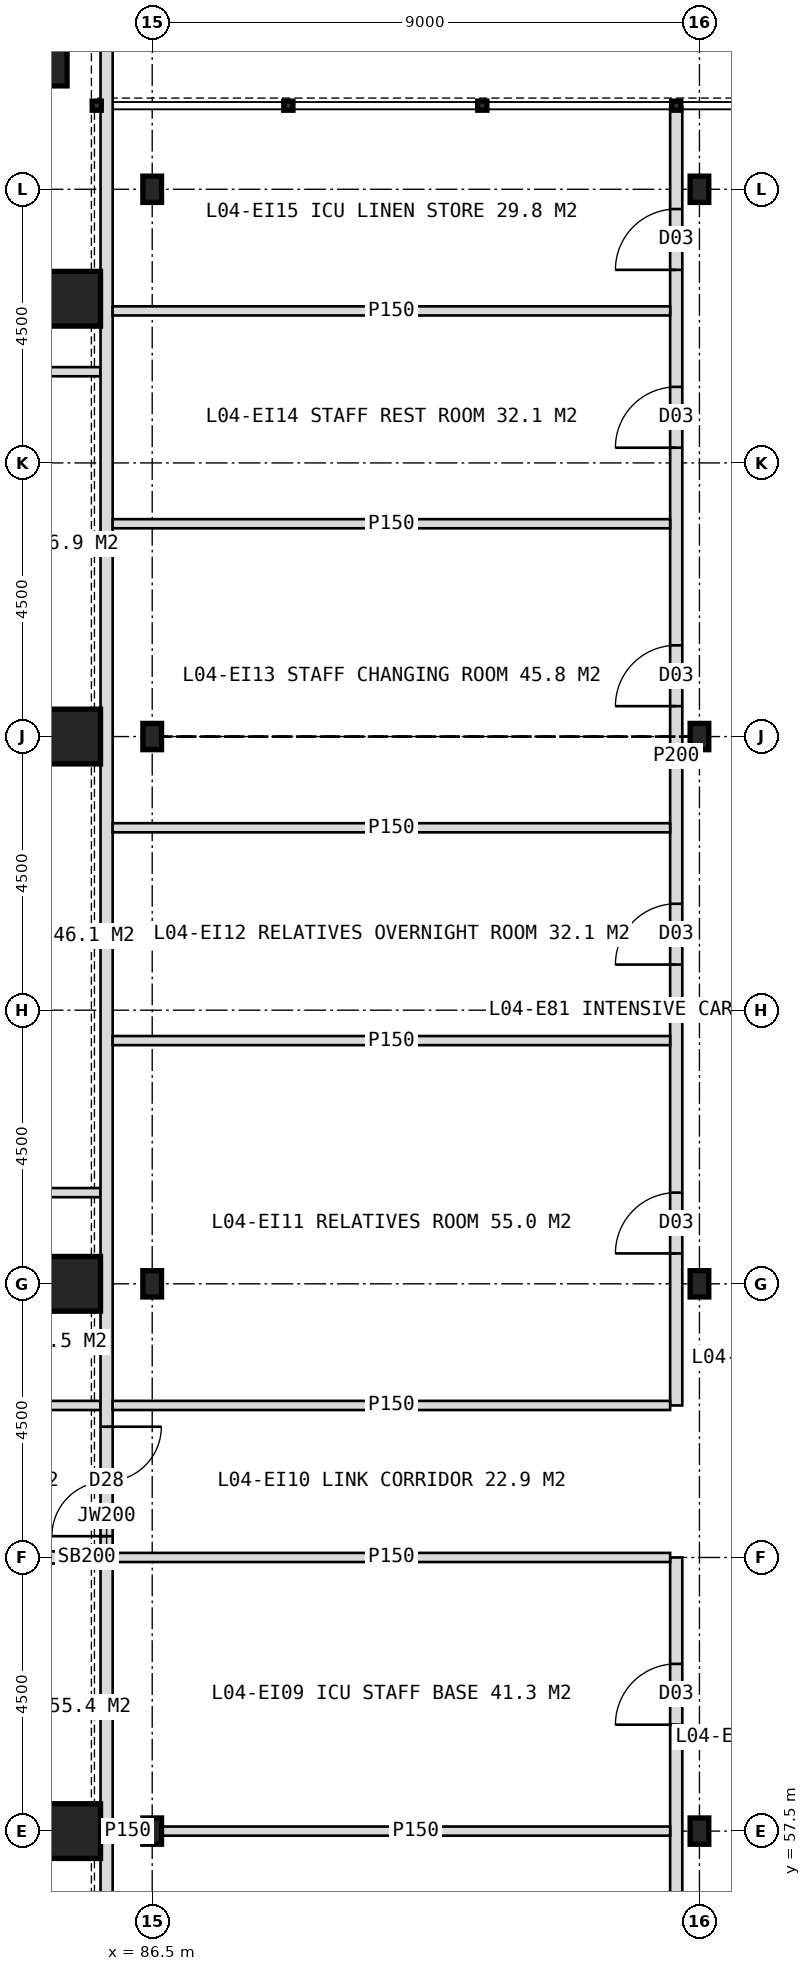
"""IFC4 building model, lengths in metres.
Left out: names, types, materials, properties, quantities, classifications, styles, units other than length and angle.
Written with IfcOpenShell. Run it as: python <this file> out.ifc"""

import sys

from ifc_helpers import new_model, si_unit, direction, frame, frame_2d, origin, origin_2d, place, context, subcontext, project, spatial, rectangle, hollow_rectangle, i_section, extrude, element, fill, save


model = new_model("IFC4")
c1 = context("Model", 3, precision=1e-05, world=origin(), true_north=direction((0.0, 1.0)))
c2 = subcontext(c1, "Body", "Model", "MODEL_VIEW")
j1 = project(units=[si_unit("LENGTHUNIT", "METRE"), si_unit("PLANEANGLEUNIT", "RADIAN")], contexts=[c1])
p1 = place(None, origin())
s1 = spatial("IfcSite", under=j1, at=p1, CompositionType="ELEMENT")
p2 = place(p1, origin())
s2 = spatial("IfcBuilding", under=s1, at=p2, CompositionType="ELEMENT")
p3 = place(p2, frame((0.0, 0.0, 21.0)))
s3 = spatial("IfcBuildingStorey", under=s2, at=p3, CompositionType="ELEMENT", Elevation=21.0)
for number, where, z_axis, x_axis in (
    (1, (85.2, 57.5, 0.0), (0.0, 0.0, 1.0), (1.0, 0.0, 0.0)),
    (2, (85.2, 66.5, 0.0), (0.0, 0.0, 1.0), (1.0, 0.0, 0.0)),
    (3, (85.2, 75.5, 0.0), (0.0, 0.0, 1.0), (1.0, 0.0, 0.0)),
    (4, (85.2, 82.7, 0.0), (0.0, 0.0, 1.0), (1.0, 0.0, 0.0)),
    (5, (84.65, 86.65, 0.0), (0.0, 0.0, 1.0), (1.0, 0.0, 0.0)),
):
    element("IfcColumn", number, at=place(p3, frame(where, z_axis=z_axis, x_axis=x_axis)), inside=s3, PredefinedType="COLUMN", context=c2, shape_type="SweptSolid", body=[
        extrude(hollow_rectangle(XDim=0.9, YDim=0.9, WallThickness=0.08, at=origin_2d()), origin(), (0.0, 0.0, 1.0), 5.0),
    ])
for number, where, z_axis, x_axis in (
    (6, (86.5, 57.5, 0.0), (0.0, 0.0, 1.0), (1.0, 0.0, 0.0)),
    (7, (86.5, 66.5, 0.0), (0.0, 0.0, 1.0), (1.0, 0.0, 0.0)),
    (8, (86.5, 75.5, 0.0), (0.0, 0.0, 1.0), (1.0, 0.0, 0.0)),
    (9, (86.5, 84.5, 0.0), (0.0, 0.0, 1.0), (1.0, 0.0, 0.0)),
    (10, (95.5, 57.5, 0.0), (0.0, 0.0, 1.0), (1.0, 0.0, 0.0)),
    (11, (95.5, 66.5, 0.0), (0.0, 0.0, 1.0), (1.0, 0.0, 0.0)),
    (12, (95.5, 75.5, 0.0), (0.0, 0.0, 1.0), (1.0, 0.0, 0.0)),
    (13, (95.5, 84.5, 0.0), (0.0, 0.0, 1.0), (1.0, 0.0, 0.0)),
):
    element("IfcColumn", number, at=place(p3, frame(where, z_axis=z_axis, x_axis=x_axis)), inside=s3, PredefinedType="COLUMN", context=c2, shape_type="SweptSolid", body=[
        extrude(i_section(OverallWidth=0.307, OverallDepth=0.432, WebThickness=0.021, FlangeThickness=0.04, FilletRadius=0.027, at=origin_2d()), origin(), (0.0, 0.0, 1.0), 5.0),
    ])
for number, where, z_axis, x_axis in (
    (14, (79.5, 81.5, 0.0), (0.0, 0.0, 1.0), (1.0, 0.0, 0.0)),
    (15, (79.5, 68.0, 0.0), (0.0, 0.0, 1.0), (1.0, 0.0, 0.0)),
    (16, (79.5, 64.5, 0.0), (0.0, 0.0, 1.0), (1.0, 0.0, 0.0)),
):
    element("IfcWall", number, at=place(p3, frame(where, z_axis=z_axis, x_axis=x_axis)), inside=s3, PredefinedType="PARTITIONING", context=c2, shape_type="SweptSolid", body=[
        extrude(rectangle(XDim=6.15, YDim=0.15, at=frame_2d((3.075, 0.0))), origin(), (0.0, 0.0, 1.0), 4.7),
    ])
p4 = place(p3, frame((79.5, 62.0, 0.0), z_axis=(0.0, 0.0, 1.0), x_axis=(1.0, 0.0, 0.0)))
e17 = element("IfcWall", 17, at=p4, inside=s3, PredefinedType="SOLIDWALL", context=c2, shape_type="SweptSolid", body=[
    extrude(rectangle(XDim=5.7, YDim=0.2, at=frame_2d((2.85, 0.0))), origin(), (0.0, 0.0, 1.0), 3.7),
])
p5 = place(p3, frame((85.2, 62.0, 0.0), z_axis=(0.0, 0.0, 1.0), x_axis=(1.0, 0.0, 0.0)))
e18 = element("IfcWall", 18, at=p5, inside=s3, PredefinedType="SOLIDWALL", context=c2, shape_type="SweptSolid", body=[
    extrude(rectangle(XDim=0.45, YDim=0.2, at=frame_2d((0.225, 0.0))), origin(), (0.0, 0.0, 1.0), 4.7),
])
p6 = place(p3, frame((95.118, 45.4, 0.0), z_axis=(0.0, 0.0, 1.0), x_axis=(0.0, 1.0, 0.0)))
e19 = element("IfcWall", 19, at=p6, inside=s3, PredefinedType="PARTITIONING", context=c2, shape_type="SweptSolid", body=[
    extrude(rectangle(XDim=16.6, YDim=0.2, at=frame_2d((8.3, 0.0))), origin(), (0.0, 0.0, 1.0), 4.7),
])
p7 = place(p6, frame((1.15, 0.0, 0.0)))
e20 = element("IfcOpeningElement", 20, at=p7, cuts=e19, PredefinedType="OPENING", context=c2, shape_type="SweptSolid", body=[
    extrude(rectangle(XDim=1.6, YDim=2.2, at=frame_2d((0.8, 1.1))), frame((0.0, 0.11, 0.0), z_axis=(0.0, -1.0, 0.0), x_axis=(1.0, 0.0, 0.0)), (0.0, 0.0, 1.0), 0.22),
])
p8 = place(p6, frame((6.073, 0.0, 0.0)))
e21 = element("IfcOpeningElement", 21, at=p8, cuts=e19, PredefinedType="OPENING", context=c2, shape_type="SweptSolid", body=[
    extrude(rectangle(XDim=1.0, YDim=2.1, at=frame_2d((0.5, 1.05))), frame((0.0, 0.11, 0.0), z_axis=(0.0, -1.0, 0.0), x_axis=(1.0, 0.0, 0.0)), (0.0, 0.0, 1.0), 0.22),
])
p9 = place(p6, frame((9.374, 0.0, 0.0)))
e22 = element("IfcOpeningElement", 22, at=p9, cuts=e19, PredefinedType="OPENING", context=c2, shape_type="SweptSolid", body=[
    extrude(rectangle(XDim=1.0, YDim=2.1, at=frame_2d((0.5, 1.05))), frame((0.0, 0.11, 0.0), z_axis=(0.0, -1.0, 0.0), x_axis=(1.0, 0.0, 0.0)), (0.0, 0.0, 1.0), 0.22),
])
p10 = place(p6, frame((13.85, 0.0, 0.0)))
e23 = element("IfcOpeningElement", 23, at=p10, cuts=e19, PredefinedType="OPENING", context=c2, shape_type="SweptSolid", body=[
    extrude(rectangle(XDim=1.0, YDim=2.1, at=frame_2d((0.5, 1.05))), frame((0.0, 0.11, 0.0), z_axis=(0.0, -1.0, 0.0), x_axis=(1.0, 0.0, 0.0)), (0.0, 0.0, 1.0), 0.22),
])
p11 = place(p3, frame((95.118, 64.5, 0.0), z_axis=(0.0, 0.0, 1.0), x_axis=(0.0, 1.0, 0.0)))
e24 = element("IfcWall", 24, at=p11, inside=s3, PredefinedType="PARTITIONING", context=c2, shape_type="SweptSolid", body=[
    extrude(rectangle(XDim=21.35, YDim=0.2, at=frame_2d((10.675, 0.0))), origin(), (0.0, 0.0, 1.0), 4.7),
])
p12 = place(p11, frame((2.5, 0.0, 0.0)))
e25 = element("IfcOpeningElement", 25, at=p12, cuts=e24, PredefinedType="OPENING", context=c2, shape_type="SweptSolid", body=[
    extrude(rectangle(XDim=1.0, YDim=2.1, at=frame_2d((0.5, 1.05))), frame((0.0, 0.11, 0.0), z_axis=(0.0, -1.0, 0.0), x_axis=(1.0, 0.0, 0.0)), (0.0, 0.0, 1.0), 0.22),
])
p13 = place(p11, frame((7.25, 0.0, 0.0)))
e26 = element("IfcOpeningElement", 26, at=p13, cuts=e24, PredefinedType="OPENING", context=c2, shape_type="SweptSolid", body=[
    extrude(rectangle(XDim=1.0, YDim=2.1, at=frame_2d((0.5, 1.05))), frame((0.0, 0.11, 0.0), z_axis=(0.0, -1.0, 0.0), x_axis=(1.0, 0.0, 0.0)), (0.0, 0.0, 1.0), 0.22),
])
p14 = place(p11, frame((11.5, 0.0, 0.0)))
e27 = element("IfcOpeningElement", 27, at=p14, cuts=e24, PredefinedType="OPENING", context=c2, shape_type="SweptSolid", body=[
    extrude(rectangle(XDim=1.0, YDim=2.1, at=frame_2d((0.5, 1.05))), frame((0.0, 0.11, 0.0), z_axis=(0.0, -1.0, 0.0), x_axis=(1.0, 0.0, 0.0)), (0.0, 0.0, 1.0), 0.22),
])
p15 = place(p11, frame((15.75, 0.0, 0.0)))
e28 = element("IfcOpeningElement", 28, at=p15, cuts=e24, PredefinedType="OPENING", context=c2, shape_type="SweptSolid", body=[
    extrude(rectangle(XDim=1.0, YDim=2.1, at=frame_2d((0.5, 1.05))), frame((0.0, 0.11, 0.0), z_axis=(0.0, -1.0, 0.0), x_axis=(1.0, 0.0, 0.0)), (0.0, 0.0, 1.0), 0.22),
])
p16 = place(p11, frame((18.675, 0.0, 0.0)))
e29 = element("IfcOpeningElement", 29, at=p16, cuts=e24, PredefinedType="OPENING", context=c2, shape_type="SweptSolid", body=[
    extrude(rectangle(XDim=1.0, YDim=2.1, at=frame_2d((0.5, 1.05))), frame((0.0, 0.11, 0.0), z_axis=(0.0, -1.0, 0.0), x_axis=(1.0, 0.0, 0.0)), (0.0, 0.0, 1.0), 0.22),
])
p17 = place(p3, frame((85.75, 36.8, 0.0), z_axis=(0.0, 0.0, 1.0), x_axis=(0.0, 1.0, 0.0)))
e30 = element("IfcWall", 30, at=p17, inside=s3, PredefinedType="SOLIDWALL", context=c2, shape_type="SweptSolid", body=[
    extrude(rectangle(XDim=50.4, YDim=0.2, at=frame_2d((25.2, 0.0))), origin(), (0.0, 0.0, 1.0), 4.7),
])
p18 = place(p17, frame((6.25, 0.0, 0.0)))
e31 = element("IfcOpeningElement", 31, at=p18, cuts=e30, PredefinedType="OPENING", context=c2, shape_type="SweptSolid", body=[
    extrude(rectangle(XDim=1.8, YDim=2.2, at=frame_2d((0.9, 1.1))), frame((0.0, 0.11, 0.0), z_axis=(0.0, -1.0, 0.0), x_axis=(1.0, 0.0, 0.0)), (0.0, 0.0, 1.0), 0.22),
])
p19 = place(p17, frame((25.55, 0.0, 0.0)))
e32 = element("IfcOpeningElement", 32, at=p19, cuts=e30, PredefinedType="OPENING", context=c2, shape_type="SweptSolid", body=[
    extrude(rectangle(XDim=1.8, YDim=2.2, at=frame_2d((0.9, 1.1))), frame((0.0, 0.11, 0.0), z_axis=(0.0, -1.0, 0.0), x_axis=(1.0, 0.0, 0.0)), (0.0, 0.0, 1.0), 0.22),
])
p20 = place(p3, frame((95.018, 57.5, 0.0), z_axis=(0.0, 0.0, 1.0), x_axis=(-1.0, 0.0, 0.0)))
e33 = element("IfcWall", 33, at=p20, inside=s3, PredefinedType="PARTITIONING", context=c2, shape_type="SweptSolid", body=[
    extrude(rectangle(XDim=8.365, YDim=0.15, at=frame_2d((4.182, 0.0))), origin(), (0.0, 0.0, 1.0), 3.7),
])
p21 = place(p3, frame((86.346, 57.5, 0.0), z_axis=(0.0, 0.0, 1.0), x_axis=(-1.0, 0.0, 0.0)))
e34 = element("IfcWall", 34, at=p21, inside=s3, PredefinedType="PARTITIONING", context=c2, shape_type="SweptSolid", body=[
    extrude(rectangle(XDim=0.496, YDim=0.15, at=frame_2d((0.248, 0.0))), origin(), (0.0, 0.0, 1.0), 4.7),
])
for number, where, z_axis, x_axis in (
    (35, (95.018, 62.0, 0.0), (0.0, 0.0, 1.0), (-1.0, 0.0, 0.0)),
    (36, (95.018, 64.5, 0.0), (0.0, 0.0, 1.0), (-1.0, 0.0, 0.0)),
    (37, (95.018, 70.5, 0.0), (0.0, 0.0, 1.0), (-1.0, 0.0, 0.0)),
    (38, (95.018, 74.0, 0.0), (0.0, 0.0, 1.0), (-1.0, 0.0, 0.0)),
    (39, (95.018, 79.0, 0.0), (0.0, 0.0, 1.0), (-1.0, 0.0, 0.0)),
    (40, (95.018, 82.5, 0.0), (0.0, 0.0, 1.0), (-1.0, 0.0, 0.0)),
):
    element("IfcWall", number, at=place(p3, frame(where, z_axis=z_axis, x_axis=x_axis)), inside=s3, PredefinedType="PARTITIONING", context=c2, shape_type="SweptSolid", body=[
        extrude(rectangle(XDim=9.168, YDim=0.15, at=frame_2d((4.584, 0.0))), origin(), (0.0, 0.0, 1.0), 4.7),
    ])
p22 = place(p19, origin())
e41 = element("IfcDoor", 41, at=p22, inside=s3, OperationType="DOUBLE_DOOR_SINGLE_SWING", PredefinedType="DOOR", context=c2, shape_type="SweptSolid", body=[
    extrude(rectangle(XDim=1.8, YDim=2.2, at=frame_2d((0.9, 1.1))), frame((0.0, 0.025, 0.0), z_axis=(0.0, -1.0, 0.0), x_axis=(1.0, 0.0, 0.0)), (0.0, 0.0, 1.0), 0.05),
])
fill(e32, e41)
p23 = place(p10, origin())
e42 = element("IfcDoor", 42, at=p23, inside=s3, OperationType="SINGLE_SWING_LEFT", PredefinedType="DOOR", context=c2, shape_type="SweptSolid", body=[
    extrude(rectangle(XDim=1.0, YDim=2.1, at=frame_2d((0.5, 1.05))), frame((0.0, 0.025, 0.0), z_axis=(0.0, -1.0, 0.0), x_axis=(1.0, 0.0, 0.0)), (0.0, 0.0, 1.0), 0.05),
])
fill(e23, e42)
p24 = place(p12, origin())
e43 = element("IfcDoor", 43, at=p24, inside=s3, OperationType="SINGLE_SWING_LEFT", PredefinedType="DOOR", context=c2, shape_type="SweptSolid", body=[
    extrude(rectangle(XDim=1.0, YDim=2.1, at=frame_2d((0.5, 1.05))), frame((0.0, 0.025, 0.0), z_axis=(0.0, -1.0, 0.0), x_axis=(1.0, 0.0, 0.0)), (0.0, 0.0, 1.0), 0.05),
])
fill(e25, e43)
p25 = place(p13, origin())
e44 = element("IfcDoor", 44, at=p25, inside=s3, OperationType="SINGLE_SWING_LEFT", PredefinedType="DOOR", context=c2, shape_type="SweptSolid", body=[
    extrude(rectangle(XDim=1.0, YDim=2.1, at=frame_2d((0.5, 1.05))), frame((0.0, 0.025, 0.0), z_axis=(0.0, -1.0, 0.0), x_axis=(1.0, 0.0, 0.0)), (0.0, 0.0, 1.0), 0.05),
])
fill(e26, e44)
p26 = place(p14, origin())
e45 = element("IfcDoor", 45, at=p26, inside=s3, OperationType="SINGLE_SWING_LEFT", PredefinedType="DOOR", context=c2, shape_type="SweptSolid", body=[
    extrude(rectangle(XDim=1.0, YDim=2.1, at=frame_2d((0.5, 1.05))), frame((0.0, 0.025, 0.0), z_axis=(0.0, -1.0, 0.0), x_axis=(1.0, 0.0, 0.0)), (0.0, 0.0, 1.0), 0.05),
])
fill(e27, e45)
p27 = place(p15, origin())
e46 = element("IfcDoor", 46, at=p27, inside=s3, OperationType="SINGLE_SWING_LEFT", PredefinedType="DOOR", context=c2, shape_type="SweptSolid", body=[
    extrude(rectangle(XDim=1.0, YDim=2.1, at=frame_2d((0.5, 1.05))), frame((0.0, 0.025, 0.0), z_axis=(0.0, -1.0, 0.0), x_axis=(1.0, 0.0, 0.0)), (0.0, 0.0, 1.0), 0.05),
])
fill(e28, e46)
p28 = place(p16, origin())
e47 = element("IfcDoor", 47, at=p28, inside=s3, OperationType="SINGLE_SWING_LEFT", PredefinedType="DOOR", context=c2, shape_type="SweptSolid", body=[
    extrude(rectangle(XDim=1.0, YDim=2.1, at=frame_2d((0.5, 1.05))), frame((0.0, 0.025, 0.0), z_axis=(0.0, -1.0, 0.0), x_axis=(1.0, 0.0, 0.0)), (0.0, 0.0, 1.0), 0.05),
])
fill(e29, e47)
save(model, sys.argv[1])
